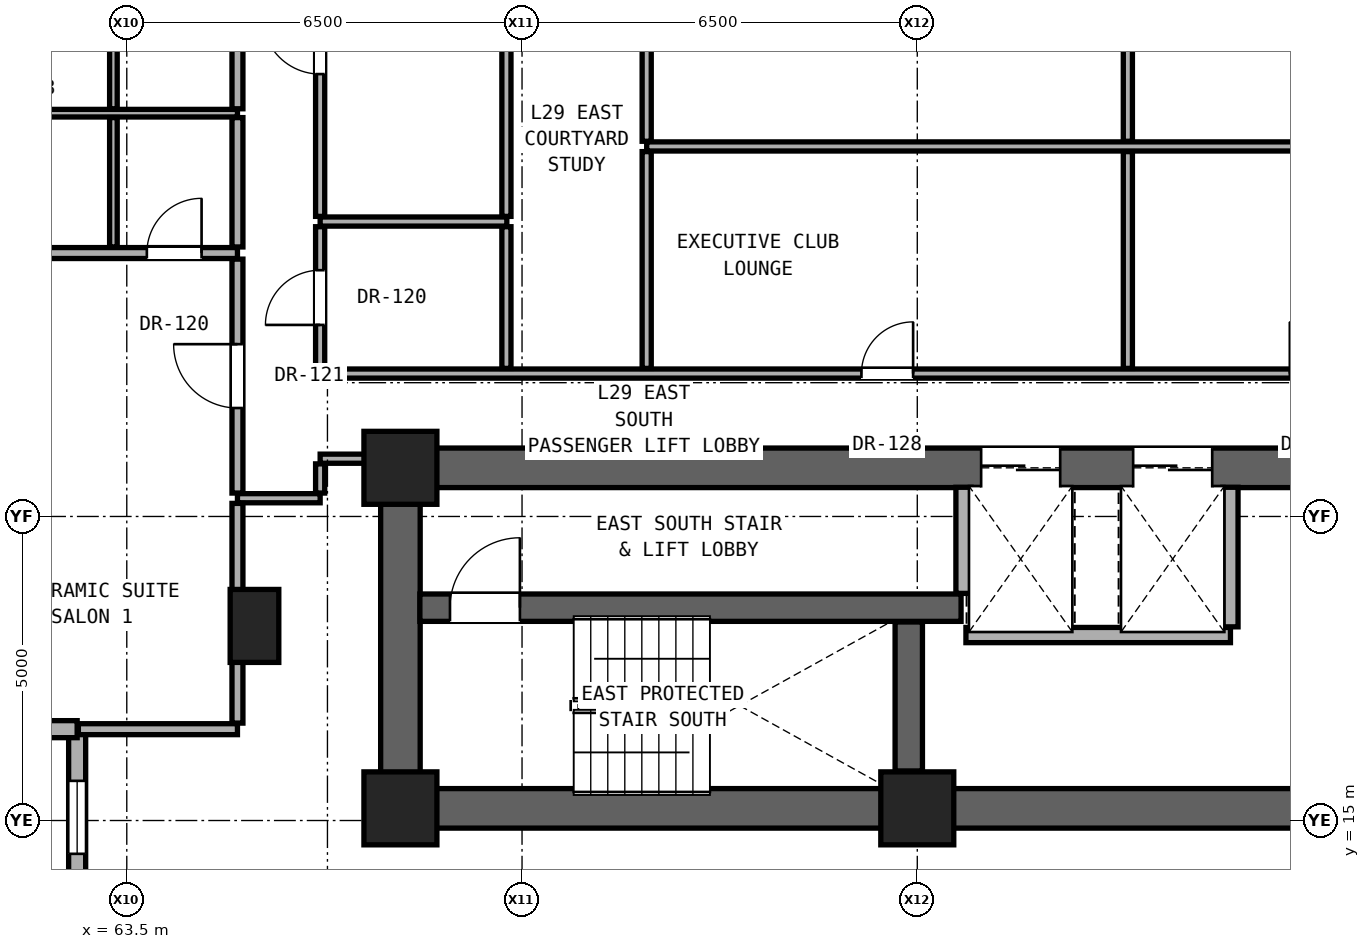
"""IFC4 building model, lengths in metres.
Left out: names, types, materials, properties, quantities, classifications, styles, units other than length and angle.
Written with IfcOpenShell. Run it as: python <this file> out.ifc"""

import sys

from ifc_helpers import new_model, si_unit, direction, frame, frame_2d, origin, origin_2d, place, context, subcontext, project, spatial, rectangle, extrude, element, fill, save


model = new_model("IFC4")
c1 = context("Model", 3, precision=1e-05, world=origin(), true_north=direction((0.0, 1.0)))
c2 = subcontext(c1, "Body", "Model", "MODEL_VIEW")
j1 = project(units=[si_unit("LENGTHUNIT", "METRE"), si_unit("PLANEANGLEUNIT", "RADIAN")], contexts=[c1])
p1 = place(None, origin())
s1 = spatial("IfcSite", under=j1, at=p1, CompositionType="ELEMENT")
p2 = place(p1, origin())
s2 = spatial("IfcBuilding", under=s1, at=p2, CompositionType="ELEMENT")
p3 = place(p2, frame((0.0, 0.0, 104.9)))
s3 = spatial("IfcBuildingStorey", under=s2, at=p3, CompositionType="ELEMENT", Elevation=104.9)
for number, where, z_axis, x_axis in (
    (1, (68.0, 15.2, 0.0), (0.0, 0.0, 1.0), (1.0, 0.0, 0.0)),
    (2, (76.5, 15.2, 0.0), (0.0, 0.0, 1.0), (1.0, 0.0, 0.0)),
    (3, (68.0, 20.8, 0.0), (0.0, 0.0, 1.0), (1.0, 0.0, 0.0)),
):
    element("IfcColumn", number, at=place(p3, frame(where, z_axis=z_axis, x_axis=x_axis)), inside=s3, PredefinedType="COLUMN", context=c2, shape_type="SweptSolid", body=[
        extrude(rectangle(XDim=1.2, YDim=1.2, at=origin_2d()), origin(), (0.0, 0.0, 1.0), 3.3),
    ])
p4 = place(p3, frame((65.6, 18.2, 0.0), z_axis=(0.0, 0.0, 1.0), x_axis=(1.0, 0.0, 0.0)))
e4 = element("IfcColumn", 4, at=p4, inside=s3, PredefinedType="PILASTER", context=c2, shape_type="SweptSolid", body=[
    extrude(rectangle(XDim=0.8, YDim=1.2, at=origin_2d()), origin(), (0.0, 0.0, 1.0), 3.3),
])
p5 = place(p3, frame((68.0, 15.2, 0.0), z_axis=(0.0, 0.0, 1.0), x_axis=(1.0, 0.0, 0.0)))
e5 = element("IfcWall", 5, at=p5, inside=s3, PredefinedType="SHEAR", context=c2, shape_type="SweptSolid", body=[
    extrude(rectangle(XDim=17.0, YDim=0.65, at=frame_2d((8.5, 0.0))), origin(), (0.0, 0.0, 1.0), 3.08),
])
p6 = place(p3, frame((68.0, 15.2, 0.0), z_axis=(0.0, 0.0, 1.0), x_axis=(0.0, 1.0, 0.0)))
e6 = element("IfcWall", 6, at=p6, inside=s3, PredefinedType="SHEAR", context=c2, shape_type="SweptSolid", body=[
    extrude(rectangle(XDim=5.6, YDim=0.65, at=frame_2d((2.8, 0.0))), origin(), (0.0, 0.0, 1.0), 3.08),
])
p7 = place(p3, frame((68.0, 20.8, 0.0), z_axis=(0.0, 0.0, 1.0), x_axis=(1.0, 0.0, 0.0)))
e7 = element("IfcWall", 7, at=p7, inside=s3, PredefinedType="SHEAR", context=c2, shape_type="SweptSolid", body=[
    extrude(rectangle(XDim=17.0, YDim=0.65, at=frame_2d((8.5, 0.0))), origin(), (0.0, 0.0, 1.0), 3.08),
])
p8 = place(p7, frame((9.55, 0.0, 0.0)))
e8 = element("IfcOpeningElement", 8, at=p8, cuts=e7, PredefinedType="OPENING", context=c2, shape_type="SweptSolid", body=[
    extrude(rectangle(XDim=1.3, YDim=2.3, at=frame_2d((0.65, 1.15))), frame((0.0, 0.335, 0.0), z_axis=(0.0, -1.0, 0.0), x_axis=(1.0, 0.0, 0.0)), (0.0, 0.0, 1.0), 0.67),
])
p9 = place(p7, frame((12.05, 0.0, 0.0)))
e9 = element("IfcOpeningElement", 9, at=p9, cuts=e7, PredefinedType="OPENING", context=c2, shape_type="SweptSolid", body=[
    extrude(rectangle(XDim=1.3, YDim=2.3, at=frame_2d((0.65, 1.15))), frame((0.0, 0.335, 0.0), z_axis=(0.0, -1.0, 0.0), x_axis=(1.0, 0.0, 0.0)), (0.0, 0.0, 1.0), 0.67),
])
p10 = place(p3, frame((62.684, 16.502, 0.0), z_axis=(0.0, 0.0, 1.0), x_axis=(0.0, -1.0, 0.0)))
e10 = element("IfcWall", 10, at=p10, inside=s3, PredefinedType="SOLIDWALL", context=c2, shape_type="SweptSolid", body=[
    extrude(rectangle(XDim=4.516, YDim=0.28, at=frame_2d((2.258, 0.0))), origin(), (0.0, 0.0, 1.0), 3.06),
])
p11 = place(p10, frame((0.85, 0.0, 0.81)))
e11 = element("IfcOpeningElement", 11, at=p11, cuts=e10, PredefinedType="OPENING", context=c2, shape_type="SweptSolid", body=[
    extrude(rectangle(XDim=1.2, YDim=2.1, at=frame_2d((0.6, 1.05))), frame((0.0, 0.15, 0.0), z_axis=(0.0, -1.0, 0.0), x_axis=(1.0, 0.0, 0.0)), (0.0, 0.0, 1.0), 0.3),
])
p12 = place(p3, frame((58.167, 16.502, 0.0), z_axis=(0.0, 0.0, 1.0), x_axis=(1.0, 0.0, 0.0)))
e12 = element("IfcWall", 12, at=p12, inside=s3, PredefinedType="SOLIDWALL", context=c2, shape_type="SweptSolid", body=[
    extrude(rectangle(XDim=4.516, YDim=0.28, at=frame_2d((2.258, 0.0))), origin(), (0.0, 0.0, 1.0), 3.06),
])
p13 = place(p12, frame((2.766, 0.0, 0.85)))
e13 = element("IfcOpeningElement", 13, at=p13, cuts=e12, PredefinedType="OPENING", context=c2, shape_type="SweptSolid", body=[
    extrude(rectangle(XDim=1.1, YDim=2.0, at=frame_2d((0.55, 1.0))), frame((0.0, 0.15, 0.0), z_axis=(0.0, -1.0, 0.0), x_axis=(1.0, 0.0, 0.0)), (0.0, 0.0, 1.0), 0.3),
])
p14 = place(p3, frame((62.704, 16.502, 0.0), z_axis=(0.0, 0.0, 1.0), x_axis=(1.0, 0.0, 0.0)))
e14 = element("IfcWall", 14, at=p14, inside=s3, PredefinedType="PARTITIONING", context=c2, shape_type="SweptSolid", body=[
    extrude(rectangle(XDim=2.616, YDim=0.18, at=frame_2d((1.308, 0.0))), origin(), (0.0, 0.0, 1.0), 3.08),
])
p15 = place(p3, frame((77.3, 18.05, 0.0), z_axis=(0.0, 0.0, 1.0), x_axis=(1.0, 0.0, 0.0)))
e15 = element("IfcWall", 15, at=p15, inside=s3, PredefinedType="SOLIDWALL", context=c2, shape_type="SweptSolid", body=[
    extrude(rectangle(XDim=4.35, YDim=0.25, at=frame_2d((2.175, 0.0))), origin(), (0.0, 0.0, 1.0), 3.08),
])
p16 = place(p3, frame((68.32, 18.5, 0.0), z_axis=(0.0, 0.0, 1.0), x_axis=(1.0, 0.0, 0.0)))
e16 = element("IfcWall", 16, at=p16, inside=s3, PredefinedType="SHEAR", context=c2, shape_type="SweptSolid", body=[
    extrude(rectangle(XDim=8.9, YDim=0.45, at=frame_2d((4.45, 0.0))), origin(), (0.0, 0.0, 1.0), 3.08),
])
p17 = place(p16, frame((0.495, 0.0, 0.0)))
e17 = element("IfcOpeningElement", 17, at=p17, cuts=e16, PredefinedType="OPENING", context=c2, shape_type="SweptSolid", body=[
    extrude(rectangle(XDim=1.15, YDim=2.2, at=frame_2d((0.575, 1.1))), frame((0.0, 0.235, 0.0), z_axis=(0.0, -1.0, 0.0), x_axis=(1.0, 0.0, 0.0)), (0.0, 0.0, 1.0), 0.47),
])
p18 = place(p3, frame((65.32, 20.3, 0.0), z_axis=(0.0, 0.0, 1.0), x_axis=(1.0, 0.0, 0.0)))
e18 = element("IfcWall", 18, at=p18, inside=s3, PredefinedType="PARTITIONING", context=c2, shape_type="SweptSolid", body=[
    extrude(rectangle(XDim=1.36, YDim=0.15, at=frame_2d((0.68, 0.0))), origin(), (0.0, 0.0, 1.0), 3.08),
])
p19 = place(p3, frame((66.68, 20.95, 0.0), z_axis=(0.0, 0.0, 1.0), x_axis=(1.0, 0.0, 0.0)))
e19 = element("IfcWall", 19, at=p19, inside=s3, PredefinedType="PARTITIONING", context=c2, shape_type="SweptSolid", body=[
    extrude(rectangle(XDim=1.0, YDim=0.15, at=frame_2d((0.5, 0.0))), origin(), (0.0, 0.0, 1.0), 2.472),
])
p20 = place(p3, frame((66.68, 22.35, 0.0), z_axis=(0.0, 0.0, 1.0), x_axis=(1.0, 0.0, 0.0)))
e20 = element("IfcWall", 20, at=p20, inside=s3, PredefinedType="PARTITIONING", context=c2, shape_type="SweptSolid", body=[
    extrude(rectangle(XDim=19.5, YDim=0.15, at=frame_2d((9.75, 0.0))), origin(), (0.0, 0.0, 1.0), 2.145),
])
p21 = place(p20, frame((8.902, 0.0, 0.0)))
e21 = element("IfcOpeningElement", 21, at=p21, cuts=e20, PredefinedType="OPENING", context=c2, shape_type="SweptSolid", body=[
    extrude(rectangle(XDim=0.85, YDim=2.01, at=frame_2d((0.425, 1.005))), frame((0.0, 0.085, 0.0), z_axis=(0.0, -1.0, 0.0), x_axis=(1.0, 0.0, 0.0)), (0.0, 0.0, 1.0), 0.17),
])
p22 = place(p20, frame((15.947, 0.0, 0.0)))
e22 = element("IfcOpeningElement", 22, at=p22, cuts=e20, PredefinedType="OPENING", context=c2, shape_type="SweptSolid", body=[
    extrude(rectangle(XDim=0.85, YDim=2.01, at=frame_2d((0.425, 1.005))), frame((0.0, 0.085, 0.0), z_axis=(0.0, -1.0, 0.0), x_axis=(1.0, 0.0, 0.0)), (0.0, 0.0, 1.0), 0.17),
])
p23 = place(p3, frame((58.167, 24.332, 0.0), z_axis=(0.0, 0.0, 1.0), x_axis=(1.0, 0.0, 0.0)))
e23 = element("IfcWall", 23, at=p23, inside=s3, PredefinedType="PARTITIONING", context=c2, shape_type="SweptSolid", body=[
    extrude(rectangle(XDim=7.153, YDim=0.18, at=frame_2d((3.577, 0.0))), origin(), (0.0, 0.0, 1.0), 2.216),
])
p24 = place(p23, frame((2.102, 0.0, 0.0)))
e24 = element("IfcOpeningElement", 24, at=p24, cuts=e23, PredefinedType="OPENING", context=c2, shape_type="SweptSolid", body=[
    extrude(rectangle(XDim=0.95, YDim=2.15, at=frame_2d((0.475, 1.075))), frame((0.0, 0.1, 0.0), z_axis=(0.0, -1.0, 0.0), x_axis=(1.0, 0.0, 0.0)), (0.0, 0.0, 1.0), 0.2),
])
p25 = place(p23, frame((5.663, 0.0, 0.0)))
e25 = element("IfcOpeningElement", 25, at=p25, cuts=e23, PredefinedType="OPENING", context=c2, shape_type="SweptSolid", body=[
    extrude(rectangle(XDim=0.9, YDim=2.1, at=frame_2d((0.45, 1.05))), frame((0.0, 0.1, 0.0), z_axis=(0.0, -1.0, 0.0), x_axis=(1.0, 0.0, 0.0)), (0.0, 0.0, 1.0), 0.2),
])
p26 = place(p3, frame((66.68, 24.85, 0.0), z_axis=(0.0, 0.0, 1.0), x_axis=(1.0, 0.0, 0.0)))
e26 = element("IfcWall", 26, at=p26, inside=s3, PredefinedType="PARTITIONING", context=c2, shape_type="SweptSolid", body=[
    extrude(rectangle(XDim=3.07, YDim=0.15, at=frame_2d((1.535, 0.0))), origin(), (0.0, 0.0, 1.0), 2.145),
])
p27 = place(p3, frame((72.05, 26.085, 0.0), z_axis=(0.0, 0.0, 1.0), x_axis=(1.0, 0.0, 0.0)))
e27 = element("IfcWall", 27, at=p27, inside=s3, PredefinedType="PARTITIONING", context=c2, shape_type="SweptSolid", body=[
    extrude(rectangle(XDim=14.13, YDim=0.15, at=frame_2d((7.065, 0.0))), origin(), (0.0, 0.0, 1.0), 2.145),
])
p28 = place(p3, frame((58.167, 26.632, 0.0), z_axis=(0.0, 0.0, 1.0), x_axis=(1.0, 0.0, 0.0)))
e28 = element("IfcWall", 28, at=p28, inside=s3, PredefinedType="PARTITIONING", context=c2, shape_type="SweptSolid", body=[
    extrude(rectangle(XDim=7.153, YDim=0.125, at=frame_2d((3.577, 0.0))), origin(), (0.0, 0.0, 1.0), 2.216),
])
p29 = place(p3, frame((63.28, 24.432, 0.0), z_axis=(0.0, 0.0, 1.0), x_axis=(0.0, 1.0, 0.0)))
e29 = element("IfcWall", 29, at=p29, inside=s3, PredefinedType="PARTITIONING", context=c2, shape_type="SweptSolid", body=[
    extrude(rectangle(XDim=2.128, YDim=0.125, at=frame_2d((1.064, 0.0))), origin(), (0.0, 0.0, 1.0), 3.08),
])
p30 = place(p3, frame((63.28, 26.705, 0.0), z_axis=(0.0, 0.0, 1.0), x_axis=(0.0, 1.0, 0.0)))
e30 = element("IfcWall", 30, at=p30, inside=s3, PredefinedType="PARTITIONING", context=c2, shape_type="SweptSolid", body=[
    extrude(rectangle(XDim=2.562, YDim=0.125, at=frame_2d((1.281, 0.0))), origin(), (0.0, 0.0, 1.0), 2.299),
])
p31 = place(p3, frame((65.32, 16.602, 0.0), z_axis=(0.0, 0.0, 1.0), x_axis=(0.0, 1.0, 0.0)))
e31 = element("IfcWall", 31, at=p31, inside=s3, PredefinedType="PARTITIONING", context=c2, shape_type="SweptSolid", body=[
    extrude(rectangle(XDim=3.613, YDim=0.18, at=frame_2d((1.807, 0.0))), origin(), (0.0, 0.0, 1.0), 2.456),
])
p32 = place(p3, frame((65.32, 20.385, 0.0), z_axis=(0.0, 0.0, 1.0), x_axis=(0.0, 1.0, 0.0)))
e32 = element("IfcWall", 32, at=p32, inside=s3, PredefinedType="PARTITIONING", context=c2, shape_type="SweptSolid", body=[
    extrude(rectangle(XDim=3.847, YDim=0.18, at=frame_2d((1.923, 0.0))), origin(), (0.0, 0.0, 1.0), 2.472),
])
p33 = place(p32, frame((1.398, 0.0, 0.0)))
e33 = element("IfcOpeningElement", 33, at=p33, cuts=e32, PredefinedType="OPENING", context=c2, shape_type="SweptSolid", body=[
    extrude(rectangle(XDim=1.05, YDim=2.2, at=frame_2d((0.525, 1.1))), frame((0.0, 0.1, 0.0), z_axis=(0.0, -1.0, 0.0), x_axis=(1.0, 0.0, 0.0)), (0.0, 0.0, 1.0), 0.2),
])
p34 = place(p3, frame((65.32, 24.432, 0.0), z_axis=(0.0, 0.0, 1.0), x_axis=(0.0, 1.0, 0.0)))
e34 = element("IfcWall", 34, at=p34, inside=s3, PredefinedType="PARTITIONING", context=c2, shape_type="SweptSolid", body=[
    extrude(rectangle(XDim=2.128, YDim=0.18, at=frame_2d((1.064, 0.0))), origin(), (0.0, 0.0, 1.0), 3.08),
])
p35 = place(p3, frame((65.32, 26.705, 0.0), z_axis=(0.0, 0.0, 1.0), x_axis=(0.0, 1.0, 0.0)))
e35 = element("IfcWall", 35, at=p35, inside=s3, PredefinedType="PARTITIONING", context=c2, shape_type="SweptSolid", body=[
    extrude(rectangle(XDim=2.562, YDim=0.18, at=frame_2d((1.281, 0.0))), origin(), (0.0, 0.0, 1.0), 2.299),
])
p36 = place(p3, frame((66.68, 20.385, 0.0), z_axis=(0.0, 0.0, 1.0), x_axis=(0.0, 1.0, 0.0)))
e36 = element("IfcWall", 36, at=p36, inside=s3, PredefinedType="PARTITIONING", context=c2, shape_type="SweptSolid", body=[
    extrude(rectangle(XDim=0.48, YDim=0.15, at=frame_2d((0.24, 0.0))), origin(), (0.0, 0.0, 1.0), 2.472),
])
p37 = place(p3, frame((66.68, 22.435, 0.0), z_axis=(0.0, 0.0, 1.0), x_axis=(0.0, 1.0, 0.0)))
e37 = element("IfcWall", 37, at=p37, inside=s3, PredefinedType="PARTITIONING", context=c2, shape_type="SweptSolid", body=[
    extrude(rectangle(XDim=2.33, YDim=0.15, at=frame_2d((1.165, 0.0))), origin(), (0.0, 0.0, 1.0), 3.08),
])
p38 = place(p37, frame((0.715, 0.0, 0.0)))
e38 = element("IfcOpeningElement", 38, at=p38, cuts=e37, PredefinedType="OPENING", context=c2, shape_type="SweptSolid", body=[
    extrude(rectangle(XDim=0.9, YDim=2.1, at=frame_2d((0.45, 1.05))), frame((0.0, 0.085, 0.0), z_axis=(0.0, -1.0, 0.0), x_axis=(1.0, 0.0, 0.0)), (0.0, 0.0, 1.0), 0.17),
])
p39 = place(p3, frame((66.68, 24.935, 0.0), z_axis=(0.0, 0.0, 1.0), x_axis=(0.0, 1.0, 0.0)))
e39 = element("IfcWall", 39, at=p39, inside=s3, PredefinedType="PARTITIONING", context=c2, shape_type="SweptSolid", body=[
    extrude(rectangle(XDim=5.63, YDim=0.15, at=frame_2d((2.815, 0.0))), origin(), (0.0, 0.0, 1.0), 2.299),
])
p40 = place(p39, frame((2.34, 0.0, 0.0)))
e40 = element("IfcOpeningElement", 40, at=p40, cuts=e39, PredefinedType="OPENING", context=c2, shape_type="SweptSolid", body=[
    extrude(rectangle(XDim=0.95, YDim=2.15, at=frame_2d((0.475, 1.075))), frame((0.0, 0.085, 0.0), z_axis=(0.0, -1.0, 0.0), x_axis=(1.0, 0.0, 0.0)), (0.0, 0.0, 1.0), 0.17),
])
p41 = place(p3, frame((69.743, 22.435, 0.0), z_axis=(0.0, 0.0, 1.0), x_axis=(0.0, 1.0, 0.0)))
e41 = element("IfcWall", 41, at=p41, inside=s3, PredefinedType="PARTITIONING", context=c2, shape_type="SweptSolid", body=[
    extrude(rectangle(XDim=2.33, YDim=0.15, at=frame_2d((1.165, 0.0))), origin(), (0.0, 0.0, 1.0), 3.08),
])
p42 = place(p3, frame((69.743, 24.935, 0.0), z_axis=(0.0, 0.0, 1.0), x_axis=(0.0, 1.0, 0.0)))
e42 = element("IfcWall", 42, at=p42, inside=s3, PredefinedType="PARTITIONING", context=c2, shape_type="SweptSolid", body=[
    extrude(rectangle(XDim=5.63, YDim=0.15, at=frame_2d((2.815, 0.0))), origin(), (0.0, 0.0, 1.0), 2.145),
])
p43 = place(p3, frame((72.05, 22.435, 0.0), z_axis=(0.0, 0.0, 1.0), x_axis=(0.0, 1.0, 0.0)))
e43 = element("IfcWall", 43, at=p43, inside=s3, PredefinedType="PARTITIONING", context=c2, shape_type="SweptSolid", body=[
    extrude(rectangle(XDim=3.565, YDim=0.15, at=frame_2d((1.782, 0.0))), origin(), (0.0, 0.0, 1.0), 2.609),
])
p44 = place(p3, frame((72.05, 26.17, 0.0), z_axis=(0.0, 0.0, 1.0), x_axis=(0.0, 1.0, 0.0)))
e44 = element("IfcWall", 44, at=p44, inside=s3, PredefinedType="PARTITIONING", context=c2, shape_type="SweptSolid", body=[
    extrude(rectangle(XDim=4.395, YDim=0.15, at=frame_2d((2.198, 0.0))), origin(), (0.0, 0.0, 1.0), 2.145),
])
p45 = place(p3, frame((76.36, 15.815, 0.0), z_axis=(0.0, 0.0, 1.0), x_axis=(0.0, 1.0, 0.0)))
e45 = element("IfcWall", 45, at=p45, inside=s3, PredefinedType="SHEAR", context=c2, shape_type="SweptSolid", body=[
    extrude(rectangle(XDim=2.45, YDim=0.45, at=frame_2d((1.225, 0.0))), origin(), (0.0, 0.0, 1.0), 3.08),
])
p46 = place(p3, frame((77.26, 18.735, 0.0), z_axis=(0.0, 0.0, 1.0), x_axis=(0.0, 1.0, 0.0)))
e46 = element("IfcWall", 46, at=p46, inside=s3, PredefinedType="SOLIDWALL", context=c2, shape_type="SweptSolid", body=[
    extrude(rectangle(XDim=1.745, YDim=0.25, at=frame_2d((0.873, 0.0))), origin(), (0.0, 0.0, 1.0), 3.08),
])
p47 = place(p3, frame((79.963, 22.435, 0.0), z_axis=(0.0, 0.0, 1.0), x_axis=(0.0, 1.0, 0.0)))
e47 = element("IfcWall", 47, at=p47, inside=s3, PredefinedType="PARTITIONING", context=c2, shape_type="SweptSolid", body=[
    extrude(rectangle(XDim=3.565, YDim=0.15, at=frame_2d((1.782, 0.0))), origin(), (0.0, 0.0, 1.0), 3.08),
])
p48 = place(p3, frame((79.963, 26.17, 0.0), z_axis=(0.0, 0.0, 1.0), x_axis=(0.0, 1.0, 0.0)))
e48 = element("IfcWall", 48, at=p48, inside=s3, PredefinedType="PARTITIONING", context=c2, shape_type="SweptSolid", body=[
    extrude(rectangle(XDim=4.395, YDim=0.15, at=frame_2d((2.198, 0.0))), origin(), (0.0, 0.0, 1.0), 2.145),
])
p49 = place(p3, frame((81.65, 18.185, 0.0), z_axis=(0.0, 0.0, 1.0), x_axis=(0.0, 1.0, 0.0)))
e49 = element("IfcWall", 49, at=p49, inside=s3, PredefinedType="SOLIDWALL", context=c2, shape_type="SweptSolid", body=[
    extrude(rectangle(XDim=2.295, YDim=0.25, at=frame_2d((1.147, 0.0))), origin(), (0.0, 0.0, 1.0), 3.08),
])
p50 = place(p11, origin())
e50 = element("IfcWindow", 50, at=p50, inside=s3, PartitioningType="SINGLE_PANEL", PredefinedType="WINDOW", context=c2, shape_type="SweptSolid", body=[
    extrude(rectangle(XDim=1.2, YDim=2.1, at=frame_2d((0.6, 1.05))), frame((0.0, 0.03, 0.0), z_axis=(0.0, -1.0, 0.0), x_axis=(1.0, 0.0, 0.0)), (0.0, 0.0, 1.0), 0.06),
])
fill(e11, e50)
p51 = place(p17, origin())
e51 = element("IfcDoor", 51, at=p51, inside=s3, OperationType="SINGLE_SWING_RIGHT", PredefinedType="DOOR", context=c2, shape_type="SweptSolid", body=[
    extrude(rectangle(XDim=1.15, YDim=2.2, at=frame_2d((0.575, 1.1))), frame((0.0, 0.025, 0.0), z_axis=(0.0, -1.0, 0.0), x_axis=(1.0, 0.0, 0.0)), (0.0, 0.0, 1.0), 0.05),
])
fill(e17, e51)
p52 = place(p38, origin())
e52 = element("IfcDoor", 52, at=p52, inside=s3, OperationType="SINGLE_SWING_LEFT", PredefinedType="DOOR", context=c2, shape_type="SweptSolid", body=[
    extrude(rectangle(XDim=0.9, YDim=2.1, at=frame_2d((0.45, 1.05))), frame((0.0, 0.025, 0.0), z_axis=(0.0, -1.0, 0.0), x_axis=(1.0, 0.0, 0.0)), (0.0, 0.0, 1.0), 0.05),
])
fill(e38, e52)
p53 = place(p33, origin())
e53 = element("IfcDoor", 53, at=p53, inside=s3, OperationType="SINGLE_SWING_RIGHT", PredefinedType="DOOR", context=c2, shape_type="SweptSolid", body=[
    extrude(rectangle(XDim=1.05, YDim=2.2, at=frame_2d((0.525, 1.1))), frame((0.0, 0.025, 0.0), z_axis=(0.0, -1.0, 0.0), x_axis=(1.0, 0.0, 0.0)), (0.0, 0.0, 1.0), 0.05),
])
fill(e33, e53)
p54 = place(p25, origin())
e54 = element("IfcDoor", 54, at=p54, inside=s3, OperationType="SINGLE_SWING_RIGHT", PredefinedType="DOOR", context=c2, shape_type="SweptSolid", body=[
    extrude(rectangle(XDim=0.9, YDim=2.1, at=frame_2d((0.45, 1.05))), frame((0.0, 0.025, 0.0), z_axis=(0.0, -1.0, 0.0), x_axis=(1.0, 0.0, 0.0)), (0.0, 0.0, 1.0), 0.05),
])
fill(e25, e54)
p55 = place(p40, origin())
e55 = element("IfcDoor", 55, at=p55, inside=s3, OperationType="SINGLE_SWING_RIGHT", PredefinedType="DOOR", context=c2, shape_type="SweptSolid", body=[
    extrude(rectangle(XDim=0.95, YDim=2.15, at=frame_2d((0.475, 1.075))), frame((0.0, 0.025, 0.0), z_axis=(0.0, -1.0, 0.0), x_axis=(1.0, 0.0, 0.0)), (0.0, 0.0, 1.0), 0.05),
])
fill(e40, e55)
p56 = place(p21, origin())
e56 = element("IfcDoor", 56, at=p56, inside=s3, OperationType="SINGLE_SWING_RIGHT", PredefinedType="DOOR", context=c2, shape_type="SweptSolid", body=[
    extrude(rectangle(XDim=0.85, YDim=2.01, at=frame_2d((0.425, 1.005))), frame((0.0, 0.025, 0.0), z_axis=(0.0, -1.0, 0.0), x_axis=(1.0, 0.0, 0.0)), (0.0, 0.0, 1.0), 0.05),
])
fill(e21, e56)
p57 = place(p22, origin())
e57 = element("IfcDoor", 57, at=p57, inside=s3, OperationType="SINGLE_SWING_LEFT", PredefinedType="DOOR", context=c2, shape_type="SweptSolid", body=[
    extrude(rectangle(XDim=0.85, YDim=2.01, at=frame_2d((0.425, 1.005))), frame((0.0, 0.025, 0.0), z_axis=(0.0, -1.0, 0.0), x_axis=(1.0, 0.0, 0.0)), (0.0, 0.0, 1.0), 0.05),
])
fill(e22, e57)
p58 = place(p8, origin())
e58 = element("IfcDoor", 58, at=p58, inside=s3, OperationType="DOUBLE_DOOR_SLIDING", PredefinedType="DOOR", context=c2, shape_type="SweptSolid", body=[
    extrude(rectangle(XDim=1.3, YDim=2.3, at=frame_2d((0.65, 1.15))), frame((0.0, 0.025, 0.0), z_axis=(0.0, -1.0, 0.0), x_axis=(1.0, 0.0, 0.0)), (0.0, 0.0, 1.0), 0.05),
])
fill(e8, e58)
p59 = place(p9, origin())
e59 = element("IfcDoor", 59, at=p59, inside=s3, OperationType="DOUBLE_DOOR_SLIDING", PredefinedType="DOOR", context=c2, shape_type="SweptSolid", body=[
    extrude(rectangle(XDim=1.3, YDim=2.3, at=frame_2d((0.65, 1.15))), frame((0.0, 0.025, 0.0), z_axis=(0.0, -1.0, 0.0), x_axis=(1.0, 0.0, 0.0)), (0.0, 0.0, 1.0), 0.05),
])
fill(e9, e59)
save(model, sys.argv[1])
